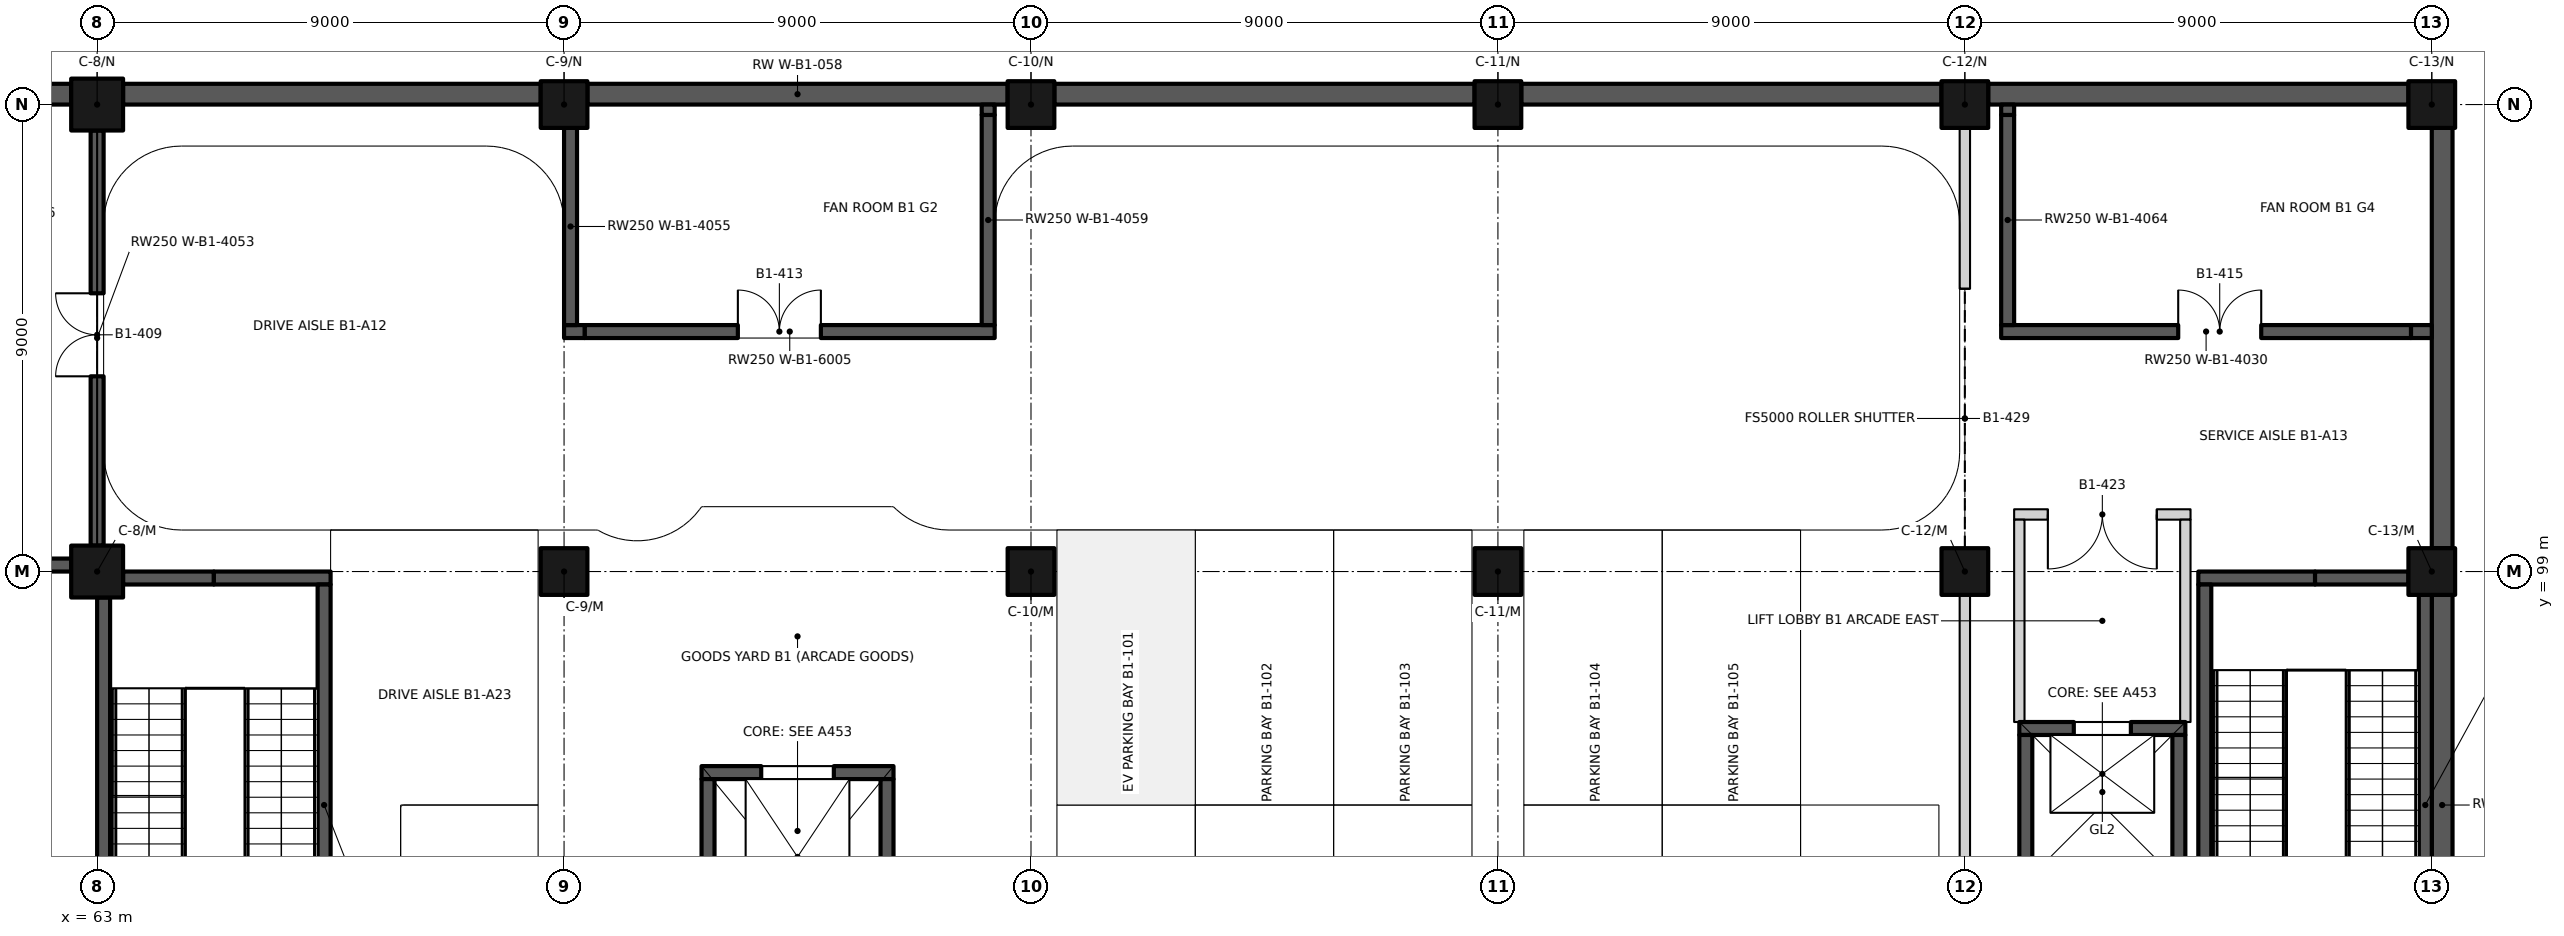
"""IFC4 building model, lengths in metres.
Left out: names, types, materials, properties, quantities, classifications, styles, units other than length and angle.
Written with IfcOpenShell. Run it as: python <this file> out.ifc"""

import sys

from ifc_helpers import new_model, si_unit, direction, frame, frame_2d, origin, origin_2d, place, context, subcontext, project, spatial, rectangle, extrude, element, fill, save


model = new_model("IFC4")
c1 = context("Model", 3, precision=1e-05, world=origin(), true_north=direction((0.0, 1.0)))
c2 = subcontext(c1, "Body", "Model", "MODEL_VIEW")
j1 = project(units=[si_unit("LENGTHUNIT", "METRE"), si_unit("PLANEANGLEUNIT", "RADIAN")], contexts=[c1])
p1 = place(None, origin())
s1 = spatial("IfcSite", under=j1, at=p1, CompositionType="ELEMENT")
p2 = place(p1, origin())
s2 = spatial("IfcBuilding", under=s1, at=p2, CompositionType="ELEMENT")
p3 = place(p2, frame((0.0, 0.0, -5.1)))
s3 = spatial("IfcBuildingStorey", under=s2, at=p3, CompositionType="ELEMENT", Elevation=-5.1)
for number, where, z_axis, x_axis in (
    (1, (108.2, 90.45, 0.0), (0.0, 0.0, 1.0), (0.0, 1.0, 0.0)),
    (2, (108.2, 99.45, 0.0), (0.0, 0.0, 1.0), (0.0, 1.0, 0.0)),
):
    element("IfcWall", number, at=place(p3, frame(where, z_axis=z_axis, x_axis=x_axis)), inside=s3, PredefinedType="SOLIDWALL", context=c2, shape_type="SweptSolid", body=[
        extrude(rectangle(XDim=8.1, YDim=0.4, at=frame_2d((4.05, 0.0))), origin(), (0.0, 0.0, 1.0), 5.1),
    ])
p4 = place(p3, frame((54.5, 108.2, 0.0), z_axis=(0.0, 0.0, 1.0), x_axis=(1.0, 0.0, 0.0)))
e3 = element("IfcWall", 3, at=p4, inside=s3, PredefinedType="SOLIDWALL", context=c2, shape_type="SweptSolid", body=[
    extrude(rectangle(XDim=8.0, YDim=0.4, at=frame_2d((4.0, 0.0))), origin(), (0.0, 0.0, 1.0), 5.1),
])
p5 = place(p3, frame((63.5, 108.2, 0.0), z_axis=(0.0, 0.0, 1.0), x_axis=(1.0, 0.0, 0.0)))
e4 = element("IfcWall", 4, at=p5, inside=s3, PredefinedType="SOLIDWALL", context=c2, shape_type="SweptSolid", body=[
    extrude(rectangle(XDim=8.05, YDim=0.4, at=frame_2d((4.025, 0.0))), origin(), (0.0, 0.0, 1.0), 5.1),
])
for number, where, z_axis, x_axis in (
    (5, (72.45, 108.2, 0.0), (0.0, 0.0, 1.0), (1.0, 0.0, 0.0)),
    (6, (81.45, 108.2, 0.0), (0.0, 0.0, 1.0), (1.0, 0.0, 0.0)),
    (7, (90.45, 108.2, 0.0), (0.0, 0.0, 1.0), (1.0, 0.0, 0.0)),
    (8, (99.45, 108.2, 0.0), (0.0, 0.0, 1.0), (1.0, 0.0, 0.0)),
):
    element("IfcWall", number, at=place(p3, frame(where, z_axis=z_axis, x_axis=x_axis)), inside=s3, PredefinedType="SOLIDWALL", context=c2, shape_type="SweptSolid", body=[
        extrude(rectangle(XDim=8.1, YDim=0.4, at=frame_2d((4.05, 0.0))), origin(), (0.0, 0.0, 1.0), 5.1),
    ])
p6 = place(p3, frame((63.0, 99.0, 0.0), z_axis=(0.0, 0.0, 1.0), x_axis=(1.0, 0.0, 0.0)))
e9 = element("IfcColumn", 9, at=p6, inside=s3, PredefinedType="COLUMN", context=c2, shape_type="SweptSolid", body=[
    extrude(rectangle(XDim=1.0, YDim=1.0, at=origin_2d()), origin(), (0.0, 0.0, 1.0), 5.1),
])
for number, where, z_axis, x_axis in (
    (10, (72.0, 99.0, 0.0), (0.0, 0.0, 1.0), (1.0, 0.0, 0.0)),
    (11, (81.0, 99.0, 0.0), (0.0, 0.0, 1.0), (1.0, 0.0, 0.0)),
    (12, (90.0, 99.0, 0.0), (0.0, 0.0, 1.0), (1.0, 0.0, 0.0)),
    (13, (99.0, 99.0, 0.0), (0.0, 0.0, 1.0), (1.0, 0.0, 0.0)),
    (14, (108.0, 99.0, 0.0), (0.0, 0.0, 1.0), (1.0, 0.0, 0.0)),
):
    element("IfcColumn", number, at=place(p3, frame(where, z_axis=z_axis, x_axis=x_axis)), inside=s3, PredefinedType="COLUMN", context=c2, shape_type="SweptSolid", body=[
        extrude(rectangle(XDim=0.9, YDim=0.9, at=origin_2d()), origin(), (0.0, 0.0, 1.0), 5.1),
    ])
p7 = place(p3, frame((63.0, 108.0, 0.0), z_axis=(0.0, 0.0, 1.0), x_axis=(1.0, 0.0, 0.0)))
e15 = element("IfcColumn", 15, at=p7, inside=s3, PredefinedType="COLUMN", context=c2, shape_type="SweptSolid", body=[
    extrude(rectangle(XDim=1.0, YDim=1.0, at=origin_2d()), origin(), (0.0, 0.0, 1.0), 5.1),
])
for number, where, z_axis, x_axis in (
    (16, (72.0, 108.0, 0.0), (0.0, 0.0, 1.0), (1.0, 0.0, 0.0)),
    (17, (81.0, 108.0, 0.0), (0.0, 0.0, 1.0), (1.0, 0.0, 0.0)),
    (18, (90.0, 108.0, 0.0), (0.0, 0.0, 1.0), (1.0, 0.0, 0.0)),
    (19, (99.0, 108.0, 0.0), (0.0, 0.0, 1.0), (1.0, 0.0, 0.0)),
    (20, (108.0, 108.0, 0.0), (0.0, 0.0, 1.0), (1.0, 0.0, 0.0)),
):
    element("IfcColumn", number, at=place(p3, frame(where, z_axis=z_axis, x_axis=x_axis)), inside=s3, PredefinedType="COLUMN", context=c2, shape_type="SweptSolid", body=[
        extrude(rectangle(XDim=0.9, YDim=0.9, at=origin_2d()), origin(), (0.0, 0.0, 1.0), 5.1),
    ])
p8 = place(p3, frame((103.5, 98.875, 0.0), z_axis=(0.0, 0.0, 1.0), x_axis=(1.0, 0.0, 0.0)))
e21 = element("IfcWall", 21, at=p8, inside=s3, PredefinedType="SHEAR", context=c2, shape_type="SweptSolid", body=[
    extrude(rectangle(XDim=2.25, YDim=0.25, at=frame_2d((1.125, 0.0))), origin(), (0.0, 0.0, 1.0), 5.1),
])
p9 = place(p3, frame((105.75, 98.875, 0.0), z_axis=(0.0, 0.0, 1.0), x_axis=(1.0, 0.0, 0.0)))
e22 = element("IfcWall", 22, at=p9, inside=s3, PredefinedType="SHEAR", context=c2, shape_type="SweptSolid", body=[
    extrude(rectangle(XDim=1.8, YDim=0.25, at=frame_2d((0.9, 0.0))), origin(), (0.0, 0.0, 1.0), 5.1),
])
p10 = place(p3, frame((103.625, 90.25, 0.0), z_axis=(0.0, 0.0, 1.0), x_axis=(0.0, 1.0, 0.0)))
e23 = element("IfcWall", 23, at=p10, inside=s3, PredefinedType="SHEAR", context=c2, shape_type="SweptSolid", body=[
    extrude(rectangle(XDim=8.5, YDim=0.25, at=frame_2d((4.25, 0.0))), origin(), (0.0, 0.0, 1.0), 5.1),
])
p11 = place(p3, frame((107.875, 90.45, 0.0), z_axis=(0.0, 0.0, 1.0), x_axis=(0.0, 1.0, 0.0)))
e24 = element("IfcWall", 24, at=p11, inside=s3, PredefinedType="SHEAR", context=c2, shape_type="SweptSolid", body=[
    extrude(rectangle(XDim=8.1, YDim=0.25, at=frame_2d((4.05, 0.0))), origin(), (0.0, 0.0, 1.0), 5.1),
])
p12 = place(p3, frame((63.5, 98.875, 0.0), z_axis=(0.0, 0.0, 1.0), x_axis=(1.0, 0.0, 0.0)))
e25 = element("IfcWall", 25, at=p12, inside=s3, PredefinedType="SHEAR", context=c2, shape_type="SweptSolid", body=[
    extrude(rectangle(XDim=1.75, YDim=0.25, at=frame_2d((0.875, 0.0))), origin(), (0.0, 0.0, 1.0), 5.1),
])
p13 = place(p3, frame((65.25, 98.875, 0.0), z_axis=(0.0, 0.0, 1.0), x_axis=(1.0, 0.0, 0.0)))
e26 = element("IfcWall", 26, at=p13, inside=s3, PredefinedType="SHEAR", context=c2, shape_type="SweptSolid", body=[
    extrude(rectangle(XDim=2.25, YDim=0.25, at=frame_2d((1.125, 0.0))), origin(), (0.0, 0.0, 1.0), 5.1),
])
p14 = place(p3, frame((63.125, 90.5, 0.0), z_axis=(0.0, 0.0, 1.0), x_axis=(0.0, 1.0, 0.0)))
e27 = element("IfcWall", 27, at=p14, inside=s3, PredefinedType="SHEAR", context=c2, shape_type="SweptSolid", body=[
    extrude(rectangle(XDim=8.0, YDim=0.25, at=frame_2d((4.0, 0.0))), origin(), (0.0, 0.0, 1.0), 5.1),
])
p15 = place(p3, frame((67.375, 90.25, 0.0), z_axis=(0.0, 0.0, 1.0), x_axis=(0.0, 1.0, 0.0)))
e28 = element("IfcWall", 28, at=p15, inside=s3, PredefinedType="SHEAR", context=c2, shape_type="SweptSolid", body=[
    extrude(rectangle(XDim=8.5, YDim=0.25, at=frame_2d((4.25, 0.0))), origin(), (0.0, 0.0, 1.0), 5.1),
])
p16 = place(p3, frame((74.65, 95.125, 0.0), z_axis=(0.0, 0.0, 1.0), x_axis=(1.0, 0.0, 0.0)))
e29 = element("IfcWall", 29, at=p16, inside=s3, PredefinedType="SHEAR", context=c2, shape_type="SweptSolid", body=[
    extrude(rectangle(XDim=3.7, YDim=0.25, at=frame_2d((1.85, 0.0))), origin(), (0.0, 0.0, 1.0), 5.1),
])
p17 = place(p16, frame((1.15, 0.0, 0.0)))
e30 = element("IfcOpeningElement", 30, at=p17, cuts=e29, PredefinedType="OPENING", context=c2, shape_type="SweptSolid", body=[
    extrude(rectangle(XDim=1.4, YDim=2.1, at=frame_2d((0.7, 1.05))), frame((0.0, 0.135, 0.0), z_axis=(0.0, -1.0, 0.0), x_axis=(1.0, 0.0, 0.0)), (0.0, 0.0, 1.0), 0.27),
])
for number, where, z_axis, x_axis in (
    (31, (74.775, 91.0, 0.0), (0.0, 0.0, 1.0), (0.0, 1.0, 0.0)),
    (32, (78.225, 91.0, 0.0), (0.0, 0.0, 1.0), (0.0, 1.0, 0.0)),
):
    element("IfcWall", number, at=place(p3, frame(where, z_axis=z_axis, x_axis=x_axis)), inside=s3, PredefinedType="SHEAR", context=c2, shape_type="SweptSolid", body=[
        extrude(rectangle(XDim=4.0, YDim=0.25, at=frame_2d((2.0, 0.0))), origin(), (0.0, 0.0, 1.0), 5.1),
    ])
p18 = place(p3, frame((100.05, 95.975, 0.0), z_axis=(0.0, 0.0, 1.0), x_axis=(1.0, 0.0, 0.0)))
e33 = element("IfcWall", 33, at=p18, inside=s3, PredefinedType="SHEAR", context=c2, shape_type="SweptSolid", body=[
    extrude(rectangle(XDim=3.2, YDim=0.25, at=frame_2d((1.6, 0.0))), origin(), (0.0, 0.0, 1.0), 5.1),
])
p19 = place(p18, frame((1.05, 0.0, 0.0)))
e34 = element("IfcOpeningElement", 34, at=p19, cuts=e33, PredefinedType="OPENING", context=c2, shape_type="SweptSolid", body=[
    extrude(rectangle(XDim=1.1, YDim=2.1, at=frame_2d((0.55, 1.05))), frame((0.0, 0.135, 0.0), z_axis=(0.0, -1.0, 0.0), x_axis=(1.0, 0.0, 0.0)), (0.0, 0.0, 1.0), 0.27),
])
for number, where, z_axis, x_axis in (
    (35, (100.175, 93.15, 0.0), (0.0, 0.0, 1.0), (0.0, 1.0, 0.0)),
    (36, (103.125, 93.15, 0.0), (0.0, 0.0, 1.0), (0.0, 1.0, 0.0)),
):
    element("IfcWall", number, at=place(p3, frame(where, z_axis=z_axis, x_axis=x_axis)), inside=s3, PredefinedType="SHEAR", context=c2, shape_type="SweptSolid", body=[
        extrude(rectangle(XDim=2.7, YDim=0.25, at=frame_2d((1.35, 0.0))), origin(), (0.0, 0.0, 1.0), 5.1),
    ])
p20 = place(p3, frame((58.5, 99.125, 0.0), z_axis=(0.0, 0.0, 1.0), x_axis=(1.0, 0.0, 0.0)))
e37 = element("IfcWall", 37, at=p20, inside=s3, PredefinedType="SOLIDWALL", context=c2, shape_type="SweptSolid", body=[
    extrude(rectangle(XDim=4.0, YDim=0.25, at=frame_2d((2.0, 0.0))), origin(), (0.0, 0.0, 1.0), 4.3),
])
p21 = place(p3, frame((99.95, 100.1, 0.0), z_axis=(0.0, 0.0, 1.0), x_axis=(1.0, 0.0, 0.0)))
e38 = element("IfcWall", 38, at=p21, inside=s3, PredefinedType="PARTITIONING", context=c2, shape_type="SweptSolid", body=[
    extrude(rectangle(XDim=3.4, YDim=0.2, at=frame_2d((1.7, 0.0))), origin(), (0.0, 0.0, 1.0), 4.75),
])
p22 = place(p21, frame((2.75, 0.0, 0.0), z_axis=(0.0, 0.0, 1.0), x_axis=(-1.0, 0.0, 0.0)))
e39 = element("IfcOpeningElement", 39, at=p22, cuts=e38, PredefinedType="OPENING", context=c2, shape_type="SweptSolid", body=[
    extrude(rectangle(XDim=2.1, YDim=2.4, at=frame_2d((1.05, 1.2))), frame((0.0, 0.11, 0.0), z_axis=(0.0, -1.0, 0.0), x_axis=(1.0, 0.0, 0.0)), (0.0, 0.0, 1.0), 0.22),
])
p23 = place(p3, frame((72.0, 103.625, 0.0), z_axis=(0.0, 0.0, 1.0), x_axis=(1.0, 0.0, 0.0)))
e40 = element("IfcWall", 40, at=p23, inside=s3, PredefinedType="SOLIDWALL", context=c2, shape_type="SweptSolid", body=[
    extrude(rectangle(XDim=0.4, YDim=0.25, at=frame_2d((0.2, 0.0))), origin(), (0.0, 0.0, 1.0), 4.3),
])
p24 = place(p3, frame((72.4, 103.625, 0.0), z_axis=(0.0, 0.0, 1.0), x_axis=(1.0, 0.0, 0.0)))
e41 = element("IfcWall", 41, at=p24, inside=s3, PredefinedType="SOLIDWALL", context=c2, shape_type="SweptSolid", body=[
    extrude(rectangle(XDim=7.9, YDim=0.25, at=frame_2d((3.95, 0.0))), origin(), (0.0, 0.0, 1.0), 4.75),
])
p25 = place(p24, frame((2.95, 0.0, 0.0)))
e42 = element("IfcOpeningElement", 42, at=p25, cuts=e41, PredefinedType="OPENING", context=c2, shape_type="SweptSolid", body=[
    extrude(rectangle(XDim=1.6, YDim=2.1, at=frame_2d((0.8, 1.05))), frame((0.0, 0.135, 0.0), z_axis=(0.0, -1.0, 0.0), x_axis=(1.0, 0.0, 0.0)), (0.0, 0.0, 1.0), 0.27),
])
p26 = place(p3, frame((99.7, 103.625, 0.0), z_axis=(0.0, 0.0, 1.0), x_axis=(1.0, 0.0, 0.0)))
e43 = element("IfcWall", 43, at=p26, inside=s3, PredefinedType="SOLIDWALL", context=c2, shape_type="SweptSolid", body=[
    extrude(rectangle(XDim=7.9, YDim=0.25, at=frame_2d((3.95, 0.0))), origin(), (0.0, 0.0, 1.0), 4.75),
])
p27 = place(p26, frame((3.413, 0.0, 0.0)))
e44 = element("IfcOpeningElement", 44, at=p27, cuts=e43, PredefinedType="OPENING", context=c2, shape_type="SweptSolid", body=[
    extrude(rectangle(XDim=1.6, YDim=2.1, at=frame_2d((0.8, 1.05))), frame((0.0, 0.135, 0.0), z_axis=(0.0, -1.0, 0.0), x_axis=(1.0, 0.0, 0.0)), (0.0, 0.0, 1.0), 0.27),
])
p28 = place(p3, frame((107.6, 103.625, 0.0), z_axis=(0.0, 0.0, 1.0), x_axis=(1.0, 0.0, 0.0)))
e45 = element("IfcWall", 45, at=p28, inside=s3, PredefinedType="SOLIDWALL", context=c2, shape_type="SweptSolid", body=[
    extrude(rectangle(XDim=0.4, YDim=0.25, at=frame_2d((0.2, 0.0))), origin(), (0.0, 0.0, 1.0), 4.3),
])
p29 = place(p3, frame((63.0, 99.5, 0.0), z_axis=(0.0, 0.0, 1.0), x_axis=(0.0, 1.0, 0.0)))
e46 = element("IfcWall", 46, at=p29, inside=s3, PredefinedType="SOLIDWALL", context=c2, shape_type="SweptSolid", body=[
    extrude(rectangle(XDim=8.0, YDim=0.25, at=frame_2d((4.0, 0.0))), origin(), (0.0, 0.0, 1.0), 4.3),
])
p30 = place(p29, frame((3.262, 0.0, 0.0)))
e47 = element("IfcOpeningElement", 47, at=p30, cuts=e46, PredefinedType="OPENING", context=c2, shape_type="SweptSolid", body=[
    extrude(rectangle(XDim=1.6, YDim=2.1, at=frame_2d((0.8, 1.05))), frame((0.0, 0.135, 0.0), z_axis=(0.0, -1.0, 0.0), x_axis=(1.0, 0.0, 0.0)), (0.0, 0.0, 1.0), 0.27),
])
p31 = place(p3, frame((72.125, 103.75, 0.0), z_axis=(0.0, 0.0, 1.0), x_axis=(0.0, 1.0, 0.0)))
e48 = element("IfcWall", 48, at=p31, inside=s3, PredefinedType="SOLIDWALL", context=c2, shape_type="SweptSolid", body=[
    extrude(rectangle(XDim=3.8, YDim=0.25, at=frame_2d((1.9, 0.0))), origin(), (0.0, 0.0, 1.0), 4.3),
])
p32 = place(p3, frame((80.175, 103.75, 0.0), z_axis=(0.0, 0.0, 1.0), x_axis=(0.0, 1.0, 0.0)))
e49 = element("IfcWall", 49, at=p32, inside=s3, PredefinedType="SOLIDWALL", context=c2, shape_type="SweptSolid", body=[
    extrude(rectangle(XDim=4.05, YDim=0.25, at=frame_2d((2.025, 0.0))), origin(), (0.0, 0.0, 1.0), 4.75),
])
p33 = place(p3, frame((80.175, 107.8, 0.0), z_axis=(0.0, 0.0, 1.0), x_axis=(0.0, 1.0, 0.0)))
e50 = element("IfcWall", 50, at=p33, inside=s3, PredefinedType="SOLIDWALL", context=c2, shape_type="SweptSolid", body=[
    extrude(rectangle(XDim=0.2, YDim=0.25, at=frame_2d((0.1, 0.0))), origin(), (0.0, 0.0, 1.0), 4.3),
])
p34 = place(p3, frame((99.0, 90.45, 0.0), z_axis=(0.0, 0.0, 1.0), x_axis=(0.0, 1.0, 0.0)))
e51 = element("IfcWall", 51, at=p34, inside=s3, PredefinedType="PARTITIONING", context=c2, shape_type="SweptSolid", body=[
    extrude(rectangle(XDim=8.1, YDim=0.2, at=frame_2d((4.05, 0.0))), origin(), (0.0, 0.0, 1.0), 4.3),
])
p35 = place(p3, frame((99.0, 99.45, 0.0), z_axis=(0.0, 0.0, 1.0), x_axis=(0.0, 1.0, 0.0)))
e52 = element("IfcWall", 52, at=p35, inside=s3, PredefinedType="PARTITIONING", context=c2, shape_type="SweptSolid", body=[
    extrude(rectangle(XDim=8.1, YDim=0.2, at=frame_2d((4.05, 0.0))), origin(), (0.0, 0.0, 1.0), 4.3),
])
p36 = place(p35, origin())
e53 = element("IfcOpeningElement", 53, at=p36, cuts=e52, PredefinedType="OPENING", context=c2, shape_type="SweptSolid", body=[
    extrude(rectangle(XDim=5.0, YDim=2.4, at=frame_2d((2.5, 1.2))), frame((0.0, 0.11, 0.0), z_axis=(0.0, -1.0, 0.0), x_axis=(1.0, 0.0, 0.0)), (0.0, 0.0, 1.0), 0.22),
])
p37 = place(p3, frame((99.825, 103.75, 0.0), z_axis=(0.0, 0.0, 1.0), x_axis=(0.0, 1.0, 0.0)))
e54 = element("IfcWall", 54, at=p37, inside=s3, PredefinedType="SOLIDWALL", context=c2, shape_type="SweptSolid", body=[
    extrude(rectangle(XDim=4.05, YDim=0.25, at=frame_2d((2.025, 0.0))), origin(), (0.0, 0.0, 1.0), 4.75),
])
p38 = place(p3, frame((99.825, 107.8, 0.0), z_axis=(0.0, 0.0, 1.0), x_axis=(0.0, 1.0, 0.0)))
e55 = element("IfcWall", 55, at=p38, inside=s3, PredefinedType="SOLIDWALL", context=c2, shape_type="SweptSolid", body=[
    extrude(rectangle(XDim=0.2, YDim=0.25, at=frame_2d((0.1, 0.0))), origin(), (0.0, 0.0, 1.0), 4.3),
])
for number, where, z_axis, x_axis in (
    (56, (100.05, 96.1, 0.0), (0.0, 0.0, 1.0), (0.0, 1.0, 0.0)),
    (57, (103.25, 96.1, 0.0), (0.0, 0.0, 1.0), (0.0, 1.0, 0.0)),
):
    element("IfcWall", number, at=place(p3, frame(where, z_axis=z_axis, x_axis=x_axis)), inside=s3, PredefinedType="PARTITIONING", context=c2, shape_type="SweptSolid", body=[
        extrude(rectangle(XDim=3.9, YDim=0.2, at=frame_2d((1.95, 0.0))), origin(), (0.0, 0.0, 1.0), 4.75),
    ])
p39 = place(p17, origin())
e58 = element("IfcDoor", 58, at=p39, inside=s3, OperationType="DOUBLE_DOOR_SLIDING", PredefinedType="DOOR", context=c2, shape_type="SweptSolid", body=[
    extrude(rectangle(XDim=1.4, YDim=2.1, at=frame_2d((0.7, 1.05))), frame((0.0, 0.025, 0.0), z_axis=(0.0, -1.0, 0.0), x_axis=(1.0, 0.0, 0.0)), (0.0, 0.0, 1.0), 0.05),
])
fill(e30, e58)
p40 = place(p19, origin())
e59 = element("IfcDoor", 59, at=p40, inside=s3, OperationType="DOUBLE_DOOR_SLIDING", PredefinedType="DOOR", context=c2, shape_type="SweptSolid", body=[
    extrude(rectangle(XDim=1.1, YDim=2.1, at=frame_2d((0.55, 1.05))), frame((0.0, 0.025, 0.0), z_axis=(0.0, -1.0, 0.0), x_axis=(1.0, 0.0, 0.0)), (0.0, 0.0, 1.0), 0.05),
])
fill(e34, e59)
p41 = place(p30, origin())
e60 = element("IfcDoor", 60, at=p41, inside=s3, OperationType="DOUBLE_DOOR_SINGLE_SWING", PredefinedType="DOOR", context=c2, shape_type="SweptSolid", body=[
    extrude(rectangle(XDim=1.6, YDim=2.1, at=frame_2d((0.8, 1.05))), frame((0.0, 0.025, 0.0), z_axis=(0.0, -1.0, 0.0), x_axis=(1.0, 0.0, 0.0)), (0.0, 0.0, 1.0), 0.05),
])
fill(e47, e60)
p42 = place(p25, origin())
e61 = element("IfcDoor", 61, at=p42, inside=s3, OperationType="DOUBLE_DOOR_SINGLE_SWING", PredefinedType="DOOR", context=c2, shape_type="SweptSolid", body=[
    extrude(rectangle(XDim=1.6, YDim=2.1, at=frame_2d((0.8, 1.05))), frame((0.0, 0.025, 0.0), z_axis=(0.0, -1.0, 0.0), x_axis=(1.0, 0.0, 0.0)), (0.0, 0.0, 1.0), 0.05),
])
fill(e42, e61)
p43 = place(p27, origin())
e62 = element("IfcDoor", 62, at=p43, inside=s3, OperationType="DOUBLE_DOOR_SINGLE_SWING", PredefinedType="DOOR", context=c2, shape_type="SweptSolid", body=[
    extrude(rectangle(XDim=1.6, YDim=2.1, at=frame_2d((0.8, 1.05))), frame((0.0, 0.025, 0.0), z_axis=(0.0, -1.0, 0.0), x_axis=(1.0, 0.0, 0.0)), (0.0, 0.0, 1.0), 0.05),
])
fill(e44, e62)
p44 = place(p22, origin())
e63 = element("IfcDoor", 63, at=p44, inside=s3, OperationType="DOUBLE_DOOR_SINGLE_SWING", PredefinedType="DOOR", context=c2, shape_type="SweptSolid", body=[
    extrude(rectangle(XDim=2.1, YDim=2.4, at=frame_2d((1.05, 1.2))), frame((0.0, 0.025, 0.0), z_axis=(0.0, -1.0, 0.0), x_axis=(1.0, 0.0, 0.0)), (0.0, 0.0, 1.0), 0.05),
])
fill(e39, e63)
p45 = place(p36, origin())
e64 = element("IfcDoor", 64, at=p45, inside=s3, OperationType="SINGLE_SWING_LEFT", PredefinedType="DOOR", context=c2, shape_type="SweptSolid", body=[
    extrude(rectangle(XDim=5.0, YDim=2.4, at=frame_2d((2.5, 1.2))), frame((0.0, 0.025, 0.0), z_axis=(0.0, -1.0, 0.0), x_axis=(1.0, 0.0, 0.0)), (0.0, 0.0, 1.0), 0.05),
])
fill(e53, e64)
save(model, sys.argv[1])
